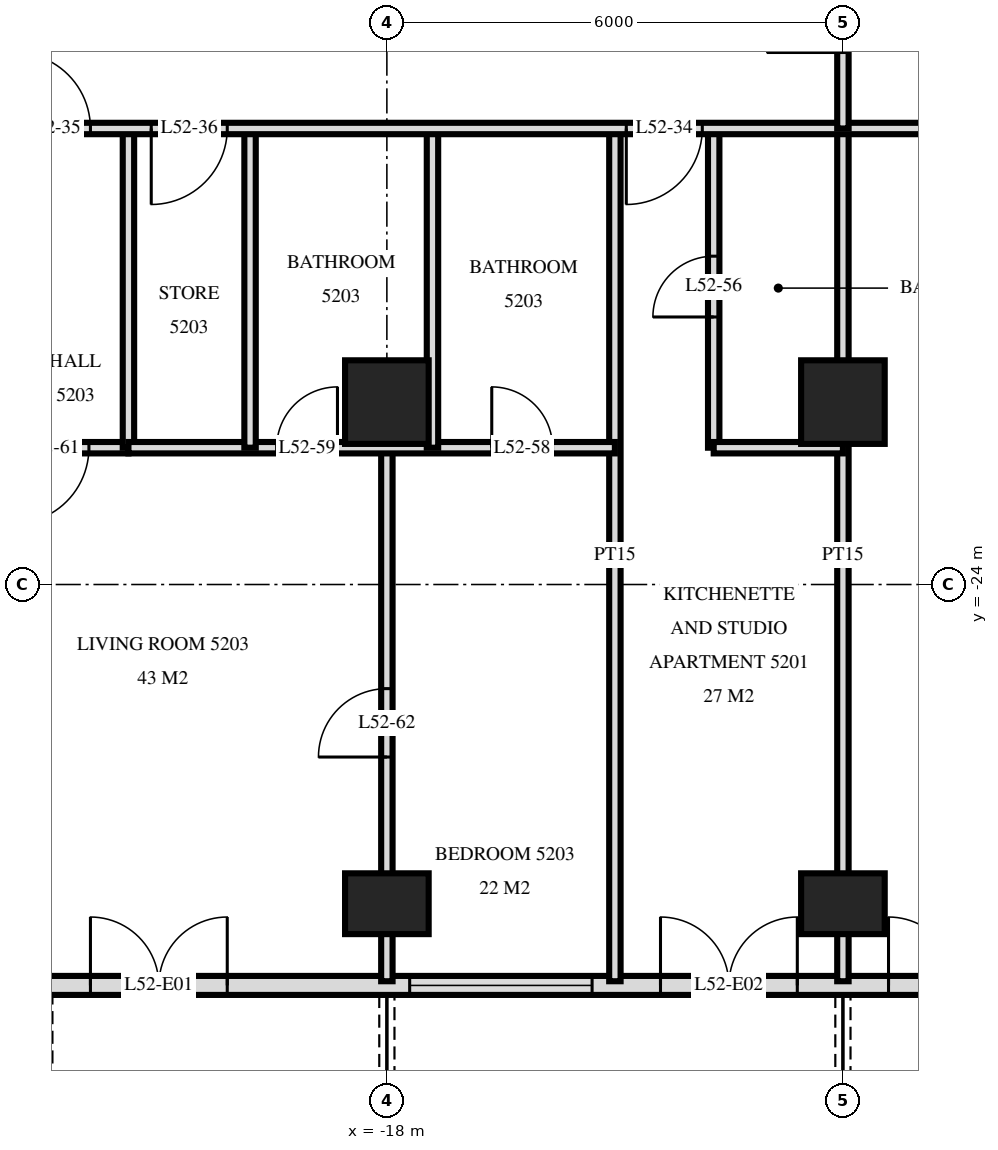
"""IFC4 building model, lengths in metres.
Left out: names, types, materials, properties, quantities, classifications, styles, units other than length and angle.
Written with IfcOpenShell. Run it as: python <this file> out.ifc"""

import sys

from ifc_helpers import new_model, si_unit, direction, frame, frame_2d, origin, origin_2d, place, context, subcontext, project, spatial, rectangle, extrude, element, fill, save


model = new_model("IFC4")
c1 = context("Model", 3, precision=1e-05, world=origin(), true_north=direction((0.0, 1.0)))
c2 = subcontext(c1, "Body", "Model", "MODEL_VIEW")
j1 = project(units=[si_unit("LENGTHUNIT", "METRE"), si_unit("PLANEANGLEUNIT", "RADIAN")], contexts=[c1])
p1 = place(None, origin())
s1 = spatial("IfcSite", under=j1, at=p1, CompositionType="ELEMENT")
p2 = place(p1, origin())
s2 = spatial("IfcBuilding", under=s1, at=p2, CompositionType="ELEMENT")
p3 = place(p2, frame((0.0, 0.0, 201.1)))
s3 = spatial("IfcBuildingStorey", under=s2, at=p3, CompositionType="ELEMENT", Elevation=201.1)
p4 = place(p3, frame((-18.0, -28.2, 0.0), z_axis=(0.0, 0.0, 1.0), x_axis=(1.0, 0.0, 0.0)))
e1 = element("IfcColumn", 1, at=p4, inside=s3, PredefinedType="COLUMN", context=c2, shape_type="SweptSolid", body=[
    extrude(rectangle(XDim=1.1, YDim=0.8, at=origin_2d()), origin(), (0.0, 0.0, 1.0), 3.5),
])
p5 = place(p3, frame((-18.0, -21.6, 0.0), z_axis=(0.0, 0.0, 1.0), x_axis=(1.0, 0.0, 0.0)))
e2 = element("IfcColumn", 2, at=p5, inside=s3, PredefinedType="COLUMN", context=c2, shape_type="SweptSolid", body=[
    extrude(rectangle(XDim=1.1, YDim=1.1, at=origin_2d()), origin(), (0.0, 0.0, 1.0), 3.5),
])
p6 = place(p3, frame((-12.0, -28.2, 0.0), z_axis=(0.0, 0.0, 1.0), x_axis=(1.0, 0.0, 0.0)))
e3 = element("IfcColumn", 3, at=p6, inside=s3, PredefinedType="COLUMN", context=c2, shape_type="SweptSolid", body=[
    extrude(rectangle(XDim=1.1, YDim=0.8, at=origin_2d()), origin(), (0.0, 0.0, 1.0), 3.5),
])
p7 = place(p3, frame((-12.0, -21.6, 0.0), z_axis=(0.0, 0.0, 1.0), x_axis=(1.0, 0.0, 0.0)))
e4 = element("IfcColumn", 4, at=p7, inside=s3, PredefinedType="COLUMN", context=c2, shape_type="SweptSolid", body=[
    extrude(rectangle(XDim=1.1, YDim=1.1, at=origin_2d()), origin(), (0.0, 0.0, 1.0), 3.5),
])
p8 = place(p3, frame((-22.475, -29.275, 0.0), z_axis=(0.0, 0.0, 1.0), x_axis=(1.0, 0.0, 0.0)))
e5 = element("IfcWall", 5, at=p8, inside=s3, PredefinedType="SOLIDWALL", context=c2, shape_type="SweptSolid", body=[
    extrude(rectangle(XDim=44.951, YDim=0.25, at=frame_2d((22.475, 0.0))), origin(), (0.0, 0.0, 1.0), 3.22),
])
p9 = place(p8, frame((0.575, 0.0, 0.0)))
e6 = element("IfcOpeningElement", 6, at=p9, cuts=e5, PredefinedType="OPENING", context=c2, shape_type="SweptSolid", body=[
    extrude(rectangle(XDim=1.8, YDim=2.4, at=frame_2d((0.9, 1.2))), frame((0.0, 0.135, 0.0), z_axis=(0.0, -1.0, 0.0), x_axis=(1.0, 0.0, 0.0)), (0.0, 0.0, 1.0), 0.27),
])
p10 = place(p8, frame((4.775, 0.0, 0.9)))
e7 = element("IfcOpeningElement", 7, at=p10, cuts=e5, PredefinedType="OPENING", context=c2, shape_type="SweptSolid", body=[
    extrude(rectangle(XDim=2.4, YDim=1.5, at=frame_2d((1.2, 0.75))), frame((0.0, 0.135, 0.0), z_axis=(0.0, -1.0, 0.0), x_axis=(1.0, 0.0, 0.0)), (0.0, 0.0, 1.0), 0.27),
])
p11 = place(p8, frame((8.075, 0.0, 0.0)))
e8 = element("IfcOpeningElement", 8, at=p11, cuts=e5, PredefinedType="OPENING", context=c2, shape_type="SweptSolid", body=[
    extrude(rectangle(XDim=1.8, YDim=2.4, at=frame_2d((0.9, 1.2))), frame((0.0, 0.135, 0.0), z_axis=(0.0, -1.0, 0.0), x_axis=(1.0, 0.0, 0.0)), (0.0, 0.0, 1.0), 0.27),
])
p12 = place(p8, frame((11.075, 0.0, 0.0)))
e9 = element("IfcOpeningElement", 9, at=p12, cuts=e5, PredefinedType="OPENING", context=c2, shape_type="SweptSolid", body=[
    extrude(rectangle(XDim=1.8, YDim=2.4, at=frame_2d((0.9, 1.2))), frame((0.0, 0.135, 0.0), z_axis=(0.0, -1.0, 0.0), x_axis=(1.0, 0.0, 0.0)), (0.0, 0.0, 1.0), 0.27),
])
p13 = place(p8, frame((13.775, 0.0, 0.9)))
e10 = element("IfcOpeningElement", 10, at=p13, cuts=e5, PredefinedType="OPENING", context=c2, shape_type="SweptSolid", body=[
    extrude(rectangle(XDim=2.4, YDim=1.5, at=frame_2d((1.2, 0.75))), frame((0.0, 0.135, 0.0), z_axis=(0.0, -1.0, 0.0), x_axis=(1.0, 0.0, 0.0)), (0.0, 0.0, 1.0), 0.27),
])
p14 = place(p8, frame((16.775, 0.0, 0.9)))
e11 = element("IfcOpeningElement", 11, at=p14, cuts=e5, PredefinedType="OPENING", context=c2, shape_type="SweptSolid", body=[
    extrude(rectangle(XDim=2.4, YDim=1.5, at=frame_2d((1.2, 0.75))), frame((0.0, 0.135, 0.0), z_axis=(0.0, -1.0, 0.0), x_axis=(1.0, 0.0, 0.0)), (0.0, 0.0, 1.0), 0.27),
])
p15 = place(p8, frame((20.075, 0.0, 0.0)))
e12 = element("IfcOpeningElement", 12, at=p15, cuts=e5, PredefinedType="OPENING", context=c2, shape_type="SweptSolid", body=[
    extrude(rectangle(XDim=1.8, YDim=2.4, at=frame_2d((0.9, 1.2))), frame((0.0, 0.135, 0.0), z_axis=(0.0, -1.0, 0.0), x_axis=(1.0, 0.0, 0.0)), (0.0, 0.0, 1.0), 0.27),
])
p16 = place(p8, frame((23.075, 0.0, 0.0)))
e13 = element("IfcOpeningElement", 13, at=p16, cuts=e5, PredefinedType="OPENING", context=c2, shape_type="SweptSolid", body=[
    extrude(rectangle(XDim=1.8, YDim=2.4, at=frame_2d((0.9, 1.2))), frame((0.0, 0.135, 0.0), z_axis=(0.0, -1.0, 0.0), x_axis=(1.0, 0.0, 0.0)), (0.0, 0.0, 1.0), 0.27),
])
p17 = place(p8, frame((25.775, 0.0, 0.9)))
e14 = element("IfcOpeningElement", 14, at=p17, cuts=e5, PredefinedType="OPENING", context=c2, shape_type="SweptSolid", body=[
    extrude(rectangle(XDim=2.4, YDim=1.5, at=frame_2d((1.2, 0.75))), frame((0.0, 0.135, 0.0), z_axis=(0.0, -1.0, 0.0), x_axis=(1.0, 0.0, 0.0)), (0.0, 0.0, 1.0), 0.27),
])
p18 = place(p8, frame((29.075, 0.0, 0.0)))
e15 = element("IfcOpeningElement", 15, at=p18, cuts=e5, PredefinedType="OPENING", context=c2, shape_type="SweptSolid", body=[
    extrude(rectangle(XDim=1.8, YDim=2.4, at=frame_2d((0.9, 1.2))), frame((0.0, 0.135, 0.0), z_axis=(0.0, -1.0, 0.0), x_axis=(1.0, 0.0, 0.0)), (0.0, 0.0, 1.0), 0.27),
])
p19 = place(p8, frame((31.775, 0.0, 0.9)))
e16 = element("IfcOpeningElement", 16, at=p19, cuts=e5, PredefinedType="OPENING", context=c2, shape_type="SweptSolid", body=[
    extrude(rectangle(XDim=2.4, YDim=1.5, at=frame_2d((1.2, 0.75))), frame((0.0, 0.135, 0.0), z_axis=(0.0, -1.0, 0.0), x_axis=(1.0, 0.0, 0.0)), (0.0, 0.0, 1.0), 0.27),
])
p20 = place(p8, frame((35.075, 0.0, 0.0)))
e17 = element("IfcOpeningElement", 17, at=p20, cuts=e5, PredefinedType="OPENING", context=c2, shape_type="SweptSolid", body=[
    extrude(rectangle(XDim=1.8, YDim=2.4, at=frame_2d((0.9, 1.2))), frame((0.0, 0.135, 0.0), z_axis=(0.0, -1.0, 0.0), x_axis=(1.0, 0.0, 0.0)), (0.0, 0.0, 1.0), 0.27),
])
p21 = place(p8, frame((37.775, 0.0, 0.9)))
e18 = element("IfcOpeningElement", 18, at=p21, cuts=e5, PredefinedType="OPENING", context=c2, shape_type="SweptSolid", body=[
    extrude(rectangle(XDim=2.4, YDim=1.5, at=frame_2d((1.2, 0.75))), frame((0.0, 0.135, 0.0), z_axis=(0.0, -1.0, 0.0), x_axis=(1.0, 0.0, 0.0)), (0.0, 0.0, 1.0), 0.27),
])
p22 = place(p8, frame((41.075, 0.0, 0.0)))
e19 = element("IfcOpeningElement", 19, at=p22, cuts=e5, PredefinedType="OPENING", context=c2, shape_type="SweptSolid", body=[
    extrude(rectangle(XDim=1.8, YDim=2.4, at=frame_2d((0.9, 1.2))), frame((0.0, 0.135, 0.0), z_axis=(0.0, -1.0, 0.0), x_axis=(1.0, 0.0, 0.0)), (0.0, 0.0, 1.0), 0.27),
])
p23 = place(p3, frame((-12.0, -18.0, 0.0), z_axis=(0.0, 0.0, 1.0), x_axis=(0.0, 1.0, 0.0)))
e20 = element("IfcWall", 20, at=p23, inside=s3, PredefinedType="PARTITIONING", context=c2, shape_type="SweptSolid", body=[
    extrude(rectangle(XDim=2.95, YDim=0.15, at=frame_2d((1.475, 0.0))), origin(), (0.0, 0.0, 1.0), 3.22),
])
p24 = place(p23, frame((1.0, 0.0, 0.0)))
e21 = element("IfcOpeningElement", 21, at=p24, cuts=e20, PredefinedType="OPENING", context=c2, shape_type="SweptSolid", body=[
    extrude(rectangle(XDim=1.0, YDim=2.1, at=frame_2d((0.5, 1.05))), frame((0.0, 0.085, 0.0), z_axis=(0.0, -1.0, 0.0), x_axis=(1.0, 0.0, 0.0)), (0.0, 0.0, 1.0), 0.17),
])
p25 = place(p3, frame((-12.0, -29.22, 0.0), z_axis=(0.0, 0.0, 1.0), x_axis=(0.0, 1.0, 0.0)))
e22 = element("IfcWall", 22, at=p25, inside=s3, PredefinedType="PARTITIONING", context=c2, shape_type="SweptSolid", body=[
    extrude(rectangle(XDim=11.22, YDim=0.15, at=frame_2d((5.61, 0.0))), origin(), (0.0, 0.0, 1.0), 3.22),
])
p26 = place(p3, frame((-13.7, -22.2, 0.0), z_axis=(0.0, 0.0, 1.0), x_axis=(0.0, 1.0, 0.0)))
e23 = element("IfcWall", 23, at=p26, inside=s3, PredefinedType="PARTITIONING", context=c2, shape_type="SweptSolid", body=[
    extrude(rectangle(XDim=4.2, YDim=0.15, at=frame_2d((2.1, 0.0))), origin(), (0.0, 0.0, 1.0), 3.22),
])
p27 = place(p26, frame((1.72, 0.0, 0.0)))
e24 = element("IfcOpeningElement", 24, at=p27, cuts=e23, PredefinedType="OPENING", context=c2, shape_type="SweptSolid", body=[
    extrude(rectangle(XDim=0.8, YDim=2.1, at=frame_2d((0.4, 1.05))), frame((0.0, 0.085, 0.0), z_axis=(0.0, -1.0, 0.0), x_axis=(1.0, 0.0, 0.0)), (0.0, 0.0, 1.0), 0.17),
])
p28 = place(p3, frame((-15.0, -29.22, 0.0), z_axis=(0.0, 0.0, 1.0), x_axis=(0.0, 1.0, 0.0)))
e25 = element("IfcWall", 25, at=p28, inside=s3, PredefinedType="PARTITIONING", context=c2, shape_type="SweptSolid", body=[
    extrude(rectangle(XDim=11.22, YDim=0.15, at=frame_2d((5.61, 0.0))), origin(), (0.0, 0.0, 1.0), 3.22),
])
p29 = place(p3, frame((-17.4, -22.2, 0.0), z_axis=(0.0, 0.0, 1.0), x_axis=(0.0, 1.0, 0.0)))
e26 = element("IfcWall", 26, at=p29, inside=s3, PredefinedType="PARTITIONING", context=c2, shape_type="SweptSolid", body=[
    extrude(rectangle(XDim=4.2, YDim=0.15, at=frame_2d((2.1, 0.0))), origin(), (0.0, 0.0, 1.0), 3.22),
])
p30 = place(p3, frame((-18.0, -29.22, 0.0), z_axis=(0.0, 0.0, 1.0), x_axis=(0.0, 1.0, 0.0)))
e27 = element("IfcWall", 27, at=p30, inside=s3, PredefinedType="PARTITIONING", context=c2, shape_type="SweptSolid", body=[
    extrude(rectangle(XDim=7.02, YDim=0.15, at=frame_2d((3.51, 0.0))), origin(), (0.0, 0.0, 1.0), 3.22),
])
p31 = place(p30, frame((2.95, 0.0, 0.0)))
e28 = element("IfcOpeningElement", 28, at=p31, cuts=e27, PredefinedType="OPENING", context=c2, shape_type="SweptSolid", body=[
    extrude(rectangle(XDim=0.9, YDim=2.1, at=frame_2d((0.45, 1.05))), frame((0.0, 0.085, 0.0), z_axis=(0.0, -1.0, 0.0), x_axis=(1.0, 0.0, 0.0)), (0.0, 0.0, 1.0), 0.17),
])
for number, where, z_axis, x_axis in (
    (29, (-19.8, -22.2, 0.0), (0.0, 0.0, 1.0), (0.0, 1.0, 0.0)),
    (30, (-21.4, -22.2, 0.0), (0.0, 0.0, 1.0), (0.0, 1.0, 0.0)),
):
    element("IfcWall", number, at=place(p3, frame(where, z_axis=z_axis, x_axis=x_axis)), inside=s3, PredefinedType="PARTITIONING", context=c2, shape_type="SweptSolid", body=[
        extrude(rectangle(XDim=4.2, YDim=0.15, at=frame_2d((2.1, 0.0))), origin(), (0.0, 0.0, 1.0), 3.22),
    ])
p32 = place(p3, frame((-23.4, -22.2, 0.0), z_axis=(0.0, 0.0, 1.0), x_axis=(1.0, 0.0, 0.0)))
e31 = element("IfcWall", 31, at=p32, inside=s3, PredefinedType="PARTITIONING", context=c2, shape_type="SweptSolid", body=[
    extrude(rectangle(XDim=2.0, YDim=0.15, at=frame_2d((1.0, 0.0))), origin(), (0.0, 0.0, 1.0), 3.22),
])
p33 = place(p32, frame((0.48, 0.0, 0.0)))
e32 = element("IfcOpeningElement", 32, at=p33, cuts=e31, PredefinedType="OPENING", context=c2, shape_type="SweptSolid", body=[
    extrude(rectangle(XDim=1.0, YDim=2.1, at=frame_2d((0.5, 1.05))), frame((0.0, 0.085, 0.0), z_axis=(0.0, -1.0, 0.0), x_axis=(1.0, 0.0, 0.0)), (0.0, 0.0, 1.0), 0.17),
])
p34 = place(p3, frame((-21.4, -22.2, 0.0), z_axis=(0.0, 0.0, 1.0), x_axis=(1.0, 0.0, 0.0)))
e33 = element("IfcWall", 33, at=p34, inside=s3, PredefinedType="PARTITIONING", context=c2, shape_type="SweptSolid", body=[
    extrude(rectangle(XDim=6.4, YDim=0.15, at=frame_2d((3.2, 0.0))), origin(), (0.0, 0.0, 1.0), 3.22),
])
p35 = place(p34, frame((4.78, 0.0, 0.0)))
e34 = element("IfcOpeningElement", 34, at=p35, cuts=e33, PredefinedType="OPENING", context=c2, shape_type="SweptSolid", body=[
    extrude(rectangle(XDim=0.8, YDim=2.1, at=frame_2d((0.4, 1.05))), frame((0.0, 0.085, 0.0), z_axis=(0.0, -1.0, 0.0), x_axis=(1.0, 0.0, 0.0)), (0.0, 0.0, 1.0), 0.17),
])
p36 = place(p34, frame((1.95, 0.0, 0.0)))
e35 = element("IfcOpeningElement", 35, at=p36, cuts=e33, PredefinedType="OPENING", context=c2, shape_type="SweptSolid", body=[
    extrude(rectangle(XDim=0.8, YDim=2.1, at=frame_2d((0.4, 1.05))), frame((0.0, 0.085, 0.0), z_axis=(0.0, -1.0, 0.0), x_axis=(1.0, 0.0, 0.0)), (0.0, 0.0, 1.0), 0.17),
])
p37 = place(p3, frame((-13.7, -22.2, 0.0), z_axis=(0.0, 0.0, 1.0), x_axis=(1.0, 0.0, 0.0)))
e36 = element("IfcWall", 36, at=p37, inside=s3, PredefinedType="PARTITIONING", context=c2, shape_type="SweptSolid", body=[
    extrude(rectangle(XDim=1.7, YDim=0.15, at=frame_2d((0.85, 0.0))), origin(), (0.0, 0.0, 1.0), 3.22),
])
p38 = place(p3, frame((-26.82, -18.0, 0.0), z_axis=(0.0, 0.0, 1.0), x_axis=(1.0, 0.0, 0.0)))
e37 = element("IfcWall", 37, at=p38, inside=s3, PredefinedType="PARTITIONING", context=c2, shape_type="SweptSolid", body=[
    extrude(rectangle(XDim=53.64, YDim=0.15, at=frame_2d((26.82, 0.0))), origin(), (0.0, 0.0, 1.0), 3.22),
])
p39 = place(p38, frame((11.97, 0.0, 0.0)))
e38 = element("IfcOpeningElement", 38, at=p39, cuts=e37, PredefinedType="OPENING", context=c2, shape_type="SweptSolid", body=[
    extrude(rectangle(XDim=1.0, YDim=2.1, at=frame_2d((0.5, 1.05))), frame((0.0, 0.085, 0.0), z_axis=(0.0, -1.0, 0.0), x_axis=(1.0, 0.0, 0.0)), (0.0, 0.0, 1.0), 0.17),
])
p40 = place(p38, frame((3.92, 0.0, 0.0)))
e39 = element("IfcOpeningElement", 39, at=p40, cuts=e37, PredefinedType="OPENING", context=c2, shape_type="SweptSolid", body=[
    extrude(rectangle(XDim=1.0, YDim=2.1, at=frame_2d((0.5, 1.05))), frame((0.0, 0.085, 0.0), z_axis=(0.0, -1.0, 0.0), x_axis=(1.0, 0.0, 0.0)), (0.0, 0.0, 1.0), 0.17),
])
p41 = place(p38, frame((5.72, 0.0, 0.0)))
e40 = element("IfcOpeningElement", 40, at=p41, cuts=e37, PredefinedType="OPENING", context=c2, shape_type="SweptSolid", body=[
    extrude(rectangle(XDim=1.0, YDim=2.1, at=frame_2d((0.5, 1.05))), frame((0.0, 0.085, 0.0), z_axis=(0.0, -1.0, 0.0), x_axis=(1.0, 0.0, 0.0)), (0.0, 0.0, 1.0), 0.17),
])
p42 = place(p38, frame((40.67, 0.0, 0.0)))
e41 = element("IfcOpeningElement", 41, at=p42, cuts=e37, PredefinedType="OPENING", context=c2, shape_type="SweptSolid", body=[
    extrude(rectangle(XDim=1.0, YDim=2.1, at=frame_2d((0.5, 1.05))), frame((0.0, 0.085, 0.0), z_axis=(0.0, -1.0, 0.0), x_axis=(1.0, 0.0, 0.0)), (0.0, 0.0, 1.0), 0.17),
])
p43 = place(p38, frame((48.72, 0.0, 0.0)))
e42 = element("IfcOpeningElement", 42, at=p43, cuts=e37, PredefinedType="OPENING", context=c2, shape_type="SweptSolid", body=[
    extrude(rectangle(XDim=1.0, YDim=2.1, at=frame_2d((0.5, 1.05))), frame((0.0, 0.085, 0.0), z_axis=(0.0, -1.0, 0.0), x_axis=(1.0, 0.0, 0.0)), (0.0, 0.0, 1.0), 0.17),
])
p44 = place(p38, frame((46.92, 0.0, 0.0)))
e43 = element("IfcOpeningElement", 43, at=p44, cuts=e37, PredefinedType="OPENING", context=c2, shape_type="SweptSolid", body=[
    extrude(rectangle(XDim=1.0, YDim=2.1, at=frame_2d((0.5, 1.05))), frame((0.0, 0.085, 0.0), z_axis=(0.0, -1.0, 0.0), x_axis=(1.0, 0.0, 0.0)), (0.0, 0.0, 1.0), 0.17),
])
p45 = place(p38, frame((17.32, 0.0, 0.0)))
e44 = element("IfcOpeningElement", 44, at=p45, cuts=e37, PredefinedType="OPENING", context=c2, shape_type="SweptSolid", body=[
    extrude(rectangle(XDim=1.0, YDim=2.1, at=frame_2d((0.5, 1.05))), frame((0.0, 0.085, 0.0), z_axis=(0.0, -1.0, 0.0), x_axis=(1.0, 0.0, 0.0)), (0.0, 0.0, 1.0), 0.17),
])
p46 = place(p38, frame((23.32, 0.0, 0.0)))
e45 = element("IfcOpeningElement", 45, at=p46, cuts=e37, PredefinedType="OPENING", context=c2, shape_type="SweptSolid", body=[
    extrude(rectangle(XDim=1.0, YDim=2.1, at=frame_2d((0.5, 1.05))), frame((0.0, 0.085, 0.0), z_axis=(0.0, -1.0, 0.0), x_axis=(1.0, 0.0, 0.0)), (0.0, 0.0, 1.0), 0.17),
])
p47 = place(p38, frame((29.32, 0.0, 0.0)))
e46 = element("IfcOpeningElement", 46, at=p47, cuts=e37, PredefinedType="OPENING", context=c2, shape_type="SweptSolid", body=[
    extrude(rectangle(XDim=1.0, YDim=2.1, at=frame_2d((0.5, 1.05))), frame((0.0, 0.085, 0.0), z_axis=(0.0, -1.0, 0.0), x_axis=(1.0, 0.0, 0.0)), (0.0, 0.0, 1.0), 0.17),
])
p48 = place(p38, frame((35.32, 0.0, 0.0)))
e47 = element("IfcOpeningElement", 47, at=p48, cuts=e37, PredefinedType="OPENING", context=c2, shape_type="SweptSolid", body=[
    extrude(rectangle(XDim=1.0, YDim=2.1, at=frame_2d((0.5, 1.05))), frame((0.0, 0.085, 0.0), z_axis=(0.0, -1.0, 0.0), x_axis=(1.0, 0.0, 0.0)), (0.0, 0.0, 1.0), 0.17),
])
p49 = place(p9, origin())
e48 = element("IfcDoor", 48, at=p49, inside=s3, OperationType="DOUBLE_DOOR_SINGLE_SWING", PredefinedType="DOOR", context=c2, shape_type="SweptSolid", body=[
    extrude(rectangle(XDim=1.8, YDim=2.4, at=frame_2d((0.9, 1.2))), frame((0.0, 0.025, 0.0), z_axis=(0.0, -1.0, 0.0), x_axis=(1.0, 0.0, 0.0)), (0.0, 0.0, 1.0), 0.05),
])
fill(e6, e48)
p50 = place(p10, origin())
e49 = element("IfcWindow", 49, at=p50, inside=s3, PartitioningType="SINGLE_PANEL", PredefinedType="WINDOW", context=c2, shape_type="SweptSolid", body=[
    extrude(rectangle(XDim=2.4, YDim=1.5, at=frame_2d((1.2, 0.75))), frame((0.0, 0.03, 0.0), z_axis=(0.0, -1.0, 0.0), x_axis=(1.0, 0.0, 0.0)), (0.0, 0.0, 1.0), 0.06),
])
fill(e7, e49)
p51 = place(p11, origin())
e50 = element("IfcDoor", 50, at=p51, inside=s3, OperationType="DOUBLE_DOOR_SINGLE_SWING", PredefinedType="DOOR", context=c2, shape_type="SweptSolid", body=[
    extrude(rectangle(XDim=1.8, YDim=2.4, at=frame_2d((0.9, 1.2))), frame((0.0, 0.025, 0.0), z_axis=(0.0, -1.0, 0.0), x_axis=(1.0, 0.0, 0.0)), (0.0, 0.0, 1.0), 0.05),
])
fill(e8, e50)
p52 = place(p12, origin())
e51 = element("IfcDoor", 51, at=p52, inside=s3, OperationType="DOUBLE_DOOR_SINGLE_SWING", PredefinedType="DOOR", context=c2, shape_type="SweptSolid", body=[
    extrude(rectangle(XDim=1.8, YDim=2.4, at=frame_2d((0.9, 1.2))), frame((0.0, 0.025, 0.0), z_axis=(0.0, -1.0, 0.0), x_axis=(1.0, 0.0, 0.0)), (0.0, 0.0, 1.0), 0.05),
])
fill(e9, e51)
p53 = place(p39, frame((0.5, 0.0, 0.0), z_axis=(0.0, 0.0, 1.0), x_axis=(-1.0, 0.0, 0.0)))
e52 = element("IfcDoor", 52, at=p53, inside=s3, OperationType="SINGLE_SWING_LEFT", PredefinedType="DOOR", context=c2, shape_type="SweptSolid", body=[
    extrude(rectangle(XDim=1.0, YDim=2.1, at=frame_2d((0.0, 1.05))), frame((0.0, -0.025, 0.0), z_axis=(0.0, 1.0, 0.0), x_axis=(-1.0, 0.0, 0.0)), (0.0, 0.0, 1.0), 0.05),
])
fill(e38, e52)
p54 = place(p40, origin())
e53 = element("IfcDoor", 53, at=p54, inside=s3, OperationType="SINGLE_SWING_RIGHT", PredefinedType="DOOR", context=c2, shape_type="SweptSolid", body=[
    extrude(rectangle(XDim=1.0, YDim=2.1, at=frame_2d((0.5, 1.05))), frame((0.0, 0.025, 0.0), z_axis=(0.0, -1.0, 0.0), x_axis=(1.0, 0.0, 0.0)), (0.0, 0.0, 1.0), 0.05),
])
fill(e39, e53)
p55 = place(p41, frame((0.5, 0.0, 0.0), z_axis=(0.0, 0.0, 1.0), x_axis=(-1.0, 0.0, 0.0)))
e54 = element("IfcDoor", 54, at=p55, inside=s3, OperationType="SINGLE_SWING_LEFT", PredefinedType="DOOR", context=c2, shape_type="SweptSolid", body=[
    extrude(rectangle(XDim=1.0, YDim=2.1, at=frame_2d((0.0, 1.05))), frame((0.0, -0.025, 0.0), z_axis=(0.0, 1.0, 0.0), x_axis=(-1.0, 0.0, 0.0)), (0.0, 0.0, 1.0), 0.05),
])
fill(e40, e54)
p56 = place(p27, origin())
e55 = element("IfcDoor", 55, at=p56, inside=s3, OperationType="SINGLE_SWING_RIGHT", PredefinedType="DOOR", context=c2, shape_type="SweptSolid", body=[
    extrude(rectangle(XDim=0.8, YDim=2.1, at=frame_2d((0.4, 1.05))), frame((0.0, 0.025, 0.0), z_axis=(0.0, -1.0, 0.0), x_axis=(1.0, 0.0, 0.0)), (0.0, 0.0, 1.0), 0.05),
])
fill(e24, e55)
p57 = place(p35, origin())
e56 = element("IfcDoor", 56, at=p57, inside=s3, OperationType="SINGLE_SWING_RIGHT", PredefinedType="DOOR", context=c2, shape_type="SweptSolid", body=[
    extrude(rectangle(XDim=0.8, YDim=2.1, at=frame_2d((0.4, 1.05))), frame((0.0, 0.025, 0.0), z_axis=(0.0, -1.0, 0.0), x_axis=(1.0, 0.0, 0.0)), (0.0, 0.0, 1.0), 0.05),
])
fill(e34, e56)
p58 = place(p36, origin())
e57 = element("IfcDoor", 57, at=p58, inside=s3, OperationType="SINGLE_SWING_LEFT", PredefinedType="DOOR", context=c2, shape_type="SweptSolid", body=[
    extrude(rectangle(XDim=0.8, YDim=2.1, at=frame_2d((0.4, 1.05))), frame((0.0, 0.025, 0.0), z_axis=(0.0, -1.0, 0.0), x_axis=(1.0, 0.0, 0.0)), (0.0, 0.0, 1.0), 0.05),
])
fill(e35, e57)
p59 = place(p33, frame((0.5, 0.0, 0.0), z_axis=(0.0, 0.0, 1.0), x_axis=(-1.0, 0.0, 0.0)))
e58 = element("IfcDoor", 58, at=p59, inside=s3, OperationType="SINGLE_SWING_LEFT", PredefinedType="DOOR", context=c2, shape_type="SweptSolid", body=[
    extrude(rectangle(XDim=1.0, YDim=2.1, at=frame_2d((0.0, 1.05))), frame((0.0, -0.025, 0.0), z_axis=(0.0, 1.0, 0.0), x_axis=(-1.0, 0.0, 0.0)), (0.0, 0.0, 1.0), 0.05),
])
fill(e32, e58)
p60 = place(p31, origin())
e59 = element("IfcDoor", 59, at=p60, inside=s3, OperationType="SINGLE_SWING_RIGHT", PredefinedType="DOOR", context=c2, shape_type="SweptSolid", body=[
    extrude(rectangle(XDim=0.9, YDim=2.1, at=frame_2d((0.45, 1.05))), frame((0.0, 0.025, 0.0), z_axis=(0.0, -1.0, 0.0), x_axis=(1.0, 0.0, 0.0)), (0.0, 0.0, 1.0), 0.05),
])
fill(e28, e59)
save(model, sys.argv[1])
